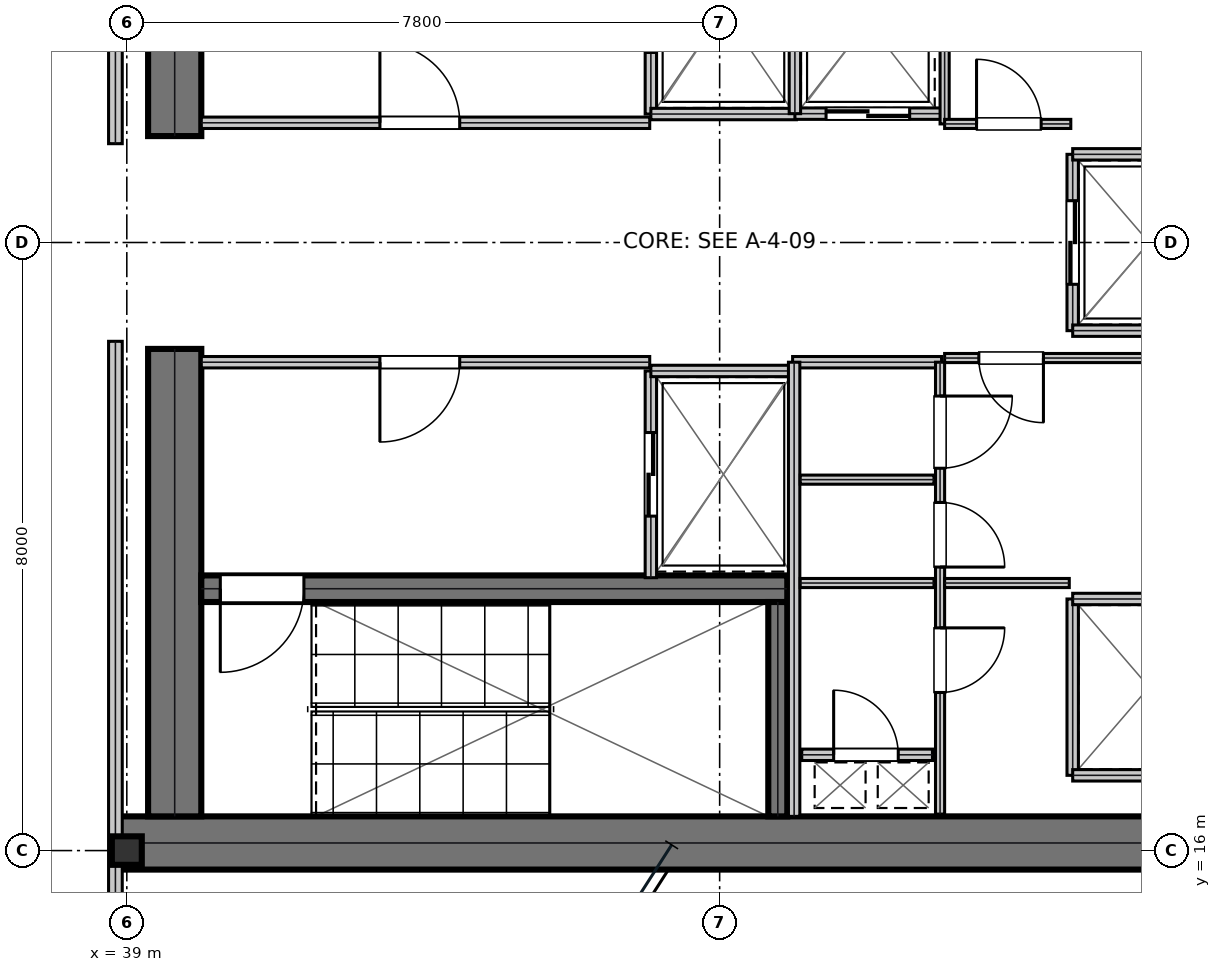
"""IFC4 building model, lengths in metres.
Left out: names, types, materials, properties, quantities, classifications, styles, units other than length and angle.
Written with IfcOpenShell. Run it as: python <this file> out.ifc"""

import sys

from ifc_helpers import new_model, si_unit, direction, frame, frame_2d, origin, origin_2d, place, context, subcontext, project, spatial, rectangle, i_section, extrude, element, fill, save


model = new_model("IFC4")
c1 = context("Model", 3, precision=1e-05, world=origin(), true_north=direction((0.0, 1.0)))
c2 = subcontext(c1, "Body", "Model", "MODEL_VIEW")
j1 = project(units=[si_unit("LENGTHUNIT", "METRE"), si_unit("PLANEANGLEUNIT", "RADIAN")], contexts=[c1])
p1 = place(None, origin())
s1 = spatial("IfcSite", under=j1, at=p1, CompositionType="ELEMENT")
p2 = place(p1, origin())
s2 = spatial("IfcBuilding", under=s1, at=p2, CompositionType="ELEMENT")
p3 = place(p2, frame((0.0, 0.0, 191.85)))
s3 = spatial("IfcBuildingStorey", under=s2, at=p3, CompositionType="ELEMENT", Elevation=191.85)
p4 = place(p3, frame((38.8, 16.1, 0.0), z_axis=(0.0, 0.0, 1.0), x_axis=(1.0, 0.0, 0.0)))
e1 = element("IfcWall", 1, at=p4, inside=s3, PredefinedType="SHEAR", context=c2, shape_type="SweptSolid", body=[
    extrude(rectangle(XDim=16.0, YDim=0.7, at=frame_2d((8.0, 0.0))), origin(), (0.0, 0.0, 1.0), 3.79),
])
for number, where, z_axis, x_axis in (
    (2, (39.63, 16.45, 0.0), (0.0, 0.0, 1.0), (0.0, 1.0, 0.0)),
    (3, (39.63, 25.4, 0.0), (0.0, 0.0, 1.0), (0.0, 1.0, 0.0)),
):
    element("IfcWall", number, at=place(p3, frame(where, z_axis=z_axis, x_axis=x_axis)), inside=s3, PredefinedType="SHEAR", context=c2, shape_type="SweptSolid", body=[
        extrude(rectangle(XDim=6.15, YDim=0.7, at=frame_2d((3.075, 0.0))), origin(), (0.0, 0.0, 1.0), 3.79),
    ])
p5 = place(p3, frame((39.98, 19.445, 0.0), z_axis=(0.0, 0.0, 1.0), x_axis=(1.0, 0.0, 0.0)))
e4 = element("IfcWall", 4, at=p5, inside=s3, PredefinedType="SHEAR", context=c2, shape_type="SweptSolid", body=[
    extrude(rectangle(XDim=7.71, YDim=0.35, at=frame_2d((3.855, 0.0))), origin(), (0.0, 0.0, 1.0), 3.79),
])
p6 = place(p5, frame((0.25, 0.0, 0.0)))
e5 = element("IfcOpeningElement", 5, at=p6, cuts=e4, PredefinedType="OPENING", context=c2, shape_type="SweptSolid", body=[
    extrude(rectangle(XDim=1.1, YDim=2.15, at=frame_2d((0.55, 1.075))), frame((0.0, 0.185, 0.0), z_axis=(0.0, -1.0, 0.0), x_axis=(1.0, 0.0, 0.0)), (0.0, 0.0, 1.0), 0.37),
])
p7 = place(p3, frame((47.565, 16.45, 0.0), z_axis=(0.0, 0.0, 1.0), x_axis=(0.0, 1.0, 0.0)))
e6 = element("IfcWall", 6, at=p7, inside=s3, PredefinedType="SHEAR", context=c2, shape_type="SweptSolid", body=[
    extrude(rectangle(XDim=2.82, YDim=0.25, at=frame_2d((1.41, 0.0))), origin(), (0.0, 0.0, 1.0), 3.79),
])
p8 = place(p3, frame((39.0, 16.0, 0.0), z_axis=(0.0, 0.0, 1.0), x_axis=(1.0, 0.0, 0.0)))
e7 = element("IfcColumn", 7, at=p8, inside=s3, PredefinedType="COLUMN", context=c2, shape_type="SweptSolid", body=[
    extrude(i_section(OverallWidth=0.394, OverallDepth=0.375, WebThickness=0.017, FlangeThickness=0.028, at=origin_2d()), origin(), (0.0, 0.0, 1.0), 4.044),
])
p9 = place(p3, frame((39.98, 25.575, 0.0), z_axis=(0.0, 0.0, 1.0), x_axis=(1.0, 0.0, 0.0)))
e8 = element("IfcWall", 8, at=p9, inside=s3, PredefinedType="PARTITIONING", context=c2, shape_type="SweptSolid", body=[
    extrude(rectangle(XDim=5.9, YDim=0.15, at=frame_2d((2.95, 0.0))), origin(), (0.0, 0.0, 1.0), 3.79),
])
p10 = place(p9, frame((2.35, 0.0, 0.0)))
e9 = element("IfcOpeningElement", 9, at=p10, cuts=e8, PredefinedType="OPENING", context=c2, shape_type="SweptSolid", body=[
    extrude(rectangle(XDim=1.05, YDim=2.15, at=frame_2d((0.525, 1.075))), frame((0.0, 0.085, 0.0), z_axis=(0.0, -1.0, 0.0), x_axis=(1.0, 0.0, 0.0)), (0.0, 0.0, 1.0), 0.17),
])
p11 = place(p3, frame((39.98, 22.425, 0.0), z_axis=(0.0, 0.0, 1.0), x_axis=(1.0, 0.0, 0.0)))
e10 = element("IfcWall", 10, at=p11, inside=s3, PredefinedType="PARTITIONING", context=c2, shape_type="SweptSolid", body=[
    extrude(rectangle(XDim=5.9, YDim=0.15, at=frame_2d((2.95, 0.0))), origin(), (0.0, 0.0, 1.0), 3.79),
])
p12 = place(p11, frame((2.35, 0.0, 0.0)))
e11 = element("IfcOpeningElement", 11, at=p12, cuts=e10, PredefinedType="OPENING", context=c2, shape_type="SweptSolid", body=[
    extrude(rectangle(XDim=1.05, YDim=2.15, at=frame_2d((0.525, 1.075))), frame((0.0, 0.085, 0.0), z_axis=(0.0, -1.0, 0.0), x_axis=(1.0, 0.0, 0.0)), (0.0, 0.0, 1.0), 0.17),
])
p13 = place(p3, frame((45.895, 25.69, 0.0), z_axis=(0.0, 0.0, 1.0), x_axis=(0.0, 1.0, 0.0)))
e12 = element("IfcWall", 12, at=p13, inside=s3, PredefinedType="PARTITIONING", context=c2, shape_type="SweptSolid", body=[
    extrude(rectangle(XDim=2.72, YDim=0.15, at=frame_2d((1.36, 0.0))), origin(), (0.0, 0.0, 1.0), 3.79),
])
p14 = place(p13, frame((0.81, 0.0, 0.0)))
e13 = element("IfcOpeningElement", 13, at=p14, cuts=e12, PredefinedType="OPENING", context=c2, shape_type="SweptSolid", body=[
    extrude(rectangle(XDim=1.1, YDim=2.15, at=frame_2d((0.55, 1.075))), frame((0.0, 0.085, 0.0), z_axis=(0.0, -1.0, 0.0), x_axis=(1.0, 0.0, 0.0)), (0.0, 0.0, 1.0), 0.17),
])
p15 = place(p3, frame((45.895, 25.69, 0.0), z_axis=(0.0, 0.0, 1.0), x_axis=(1.0, 0.0, 0.0)))
e14 = element("IfcWall", 14, at=p15, inside=s3, PredefinedType="PARTITIONING", context=c2, shape_type="SweptSolid", body=[
    extrude(rectangle(XDim=1.915, YDim=0.15, at=frame_2d((0.958, 0.0))), origin(), (0.0, 0.0, 1.0), 3.79),
])
p16 = place(p3, frame((45.895, 19.59, 0.0), z_axis=(0.0, 0.0, 1.0), x_axis=(0.0, 1.0, 0.0)))
e15 = element("IfcWall", 15, at=p16, inside=s3, PredefinedType="PARTITIONING", context=c2, shape_type="SweptSolid", body=[
    extrude(rectangle(XDim=2.72, YDim=0.15, at=frame_2d((1.36, 0.0))), origin(), (0.0, 0.0, 1.0), 3.79),
])
p17 = place(p16, frame((0.81, 0.0, 0.0)))
e16 = element("IfcOpeningElement", 16, at=p17, cuts=e15, PredefinedType="OPENING", context=c2, shape_type="SweptSolid", body=[
    extrude(rectangle(XDim=1.1, YDim=2.15, at=frame_2d((0.55, 1.075))), frame((0.0, 0.085, 0.0), z_axis=(0.0, -1.0, 0.0), x_axis=(1.0, 0.0, 0.0)), (0.0, 0.0, 1.0), 0.17),
])
p18 = place(p3, frame((45.895, 22.31, 0.0), z_axis=(0.0, 0.0, 1.0), x_axis=(1.0, 0.0, 0.0)))
e17 = element("IfcWall", 17, at=p18, inside=s3, PredefinedType="PARTITIONING", context=c2, shape_type="SweptSolid", body=[
    extrude(rectangle(XDim=1.915, YDim=0.15, at=frame_2d((0.958, 0.0))), origin(), (0.0, 0.0, 1.0), 3.79),
])
p19 = place(p3, frame((47.79, 25.695, 0.0), z_axis=(0.0, 0.0, 1.0), x_axis=(1.0, 0.0, 0.0)))
e18 = element("IfcWall", 18, at=p19, inside=s3, PredefinedType="PARTITIONING", context=c2, shape_type="SweptSolid", body=[
    extrude(rectangle(XDim=1.92, YDim=0.15, at=frame_2d((0.96, 0.0))), origin(), (0.0, 0.0, 1.0), 3.79),
])
p20 = place(p19, frame((0.41, 0.0, 0.0)))
e19 = element("IfcOpeningElement", 19, at=p20, cuts=e18, PredefinedType="OPENING", context=c2, shape_type="SweptSolid", body=[
    extrude(rectangle(XDim=1.1, YDim=2.15, at=frame_2d((0.55, 1.075))), frame((0.0, 0.085, 0.0), z_axis=(0.0, -1.0, 0.0), x_axis=(1.0, 0.0, 0.0)), (0.0, 0.0, 1.0), 0.17),
])
p21 = place(p3, frame((47.79, 25.695, 0.0), z_axis=(0.0, 0.0, 1.0), x_axis=(0.0, 1.0, 0.0)))
e20 = element("IfcWall", 20, at=p21, inside=s3, PredefinedType="PARTITIONING", context=c2, shape_type="SweptSolid", body=[
    extrude(rectangle(XDim=2.415, YDim=0.15, at=frame_2d((1.208, 0.0))), origin(), (0.0, 0.0, 1.0), 3.79),
])
p22 = place(p3, frame((51.445, 22.84, 0.0), z_axis=(0.0, 0.0, 1.0), x_axis=(0.0, 1.0, 0.0)))
e21 = element("IfcWall", 21, at=p22, inside=s3, PredefinedType="PARTITIONING", context=c2, shape_type="SweptSolid", body=[
    extrude(rectangle(XDim=2.32, YDim=0.15, at=frame_2d((1.16, 0.0))), origin(), (0.0, 0.0, 1.0), 3.79),
])
p23 = place(p22, frame((0.61, 0.0, 0.0)))
e22 = element("IfcOpeningElement", 22, at=p23, cuts=e21, PredefinedType="OPENING", context=c2, shape_type="SweptSolid", body=[
    extrude(rectangle(XDim=1.1, YDim=2.15, at=frame_2d((0.55, 1.075))), frame((0.0, 0.085, 0.0), z_axis=(0.0, -1.0, 0.0), x_axis=(1.0, 0.0, 0.0)), (0.0, 0.0, 1.0), 0.17),
])
for number, where, z_axis, x_axis in (
    (23, (51.445, 22.84, 0.0), (0.0, 0.0, 1.0), (1.0, 0.0, 0.0)),
    (24, (51.445, 25.16, 0.0), (0.0, 0.0, 1.0), (1.0, 0.0, 0.0)),
):
    element("IfcWall", number, at=place(p3, frame(where, z_axis=z_axis, x_axis=x_axis)), inside=s3, PredefinedType="PARTITIONING", context=c2, shape_type="SweptSolid", body=[
        extrude(rectangle(XDim=2.015, YDim=0.15, at=frame_2d((1.007, 0.0))), origin(), (0.0, 0.0, 1.0), 3.79),
    ])
p24 = place(p3, frame((51.445, 16.99, 0.0), z_axis=(0.0, 0.0, 1.0), x_axis=(0.0, 1.0, 0.0)))
e25 = element("IfcWall", 25, at=p24, inside=s3, PredefinedType="PARTITIONING", context=c2, shape_type="SweptSolid", body=[
    extrude(rectangle(XDim=2.32, YDim=0.15, at=frame_2d((1.16, 0.0))), origin(), (0.0, 0.0, 1.0), 3.79),
])
for number, where, z_axis, x_axis in (
    (26, (51.445, 16.99, 0.0), (0.0, 0.0, 1.0), (1.0, 0.0, 0.0)),
    (27, (51.445, 19.31, 0.0), (0.0, 0.0, 1.0), (1.0, 0.0, 0.0)),
):
    element("IfcWall", number, at=place(p3, frame(where, z_axis=z_axis, x_axis=x_axis)), inside=s3, PredefinedType="PARTITIONING", context=c2, shape_type="SweptSolid", body=[
        extrude(rectangle(XDim=2.015, YDim=0.15, at=frame_2d((1.007, 0.0))), origin(), (0.0, 0.0, 1.0), 3.79),
    ])
p25 = place(p3, frame((47.88, 17.26, 0.0), z_axis=(0.0, 0.0, 1.0), x_axis=(1.0, 0.0, 0.0)))
e28 = element("IfcWall", 28, at=p25, inside=s3, PredefinedType="PARTITIONING", context=c2, shape_type="SweptSolid", body=[
    extrude(rectangle(XDim=1.72, YDim=0.15, at=frame_2d((0.86, 0.0))), origin(), (0.0, 0.0, 1.0), 3.79),
])
p26 = place(p25, frame((0.42, 0.0, 0.0)))
e29 = element("IfcOpeningElement", 29, at=p26, cuts=e28, PredefinedType="OPENING", context=c2, shape_type="SweptSolid", body=[
    extrude(rectangle(XDim=0.85, YDim=2.15, at=frame_2d((0.425, 1.075))), frame((0.0, 0.085, 0.0), z_axis=(0.0, -1.0, 0.0), x_axis=(1.0, 0.0, 0.0)), (0.0, 0.0, 1.0), 0.17),
])
p27 = place(p3, frame((47.76, 22.425, 0.0), z_axis=(0.0, 0.0, 1.0), x_axis=(1.0, 0.0, 0.0)))
e30 = element("IfcWall", 30, at=p27, inside=s3, PredefinedType="PARTITIONING", context=c2, shape_type="SweptSolid", body=[
    extrude(rectangle(XDim=1.96, YDim=0.15, at=frame_2d((0.98, 0.0))), origin(), (0.0, 0.0, 1.0), 3.79),
])
p28 = place(p3, frame((47.78, 16.45, 0.0), z_axis=(0.0, 0.0, 1.0), x_axis=(0.0, 1.0, 0.0)))
e31 = element("IfcWall", 31, at=p28, inside=s3, PredefinedType="PARTITIONING", context=c2, shape_type="SweptSolid", body=[
    extrude(rectangle(XDim=5.975, YDim=0.15, at=frame_2d((2.988, 0.0))), origin(), (0.0, 0.0, 1.0), 3.79),
])
for number, where, z_axis, x_axis in (
    (32, (47.86, 19.52, 0.0), (0.0, 0.0, 1.0), (1.0, 0.0, 0.0)),
    (33, (47.86, 20.88, 0.0), (0.0, 0.0, 1.0), (1.0, 0.0, 0.0)),
):
    element("IfcWall", number, at=place(p3, frame(where, z_axis=z_axis, x_axis=x_axis)), inside=s3, PredefinedType="PARTITIONING", context=c2, shape_type="SweptSolid", body=[
        extrude(rectangle(XDim=1.76, YDim=0.12, at=frame_2d((0.88, 0.0))), origin(), (0.0, 0.0, 1.0), 3.79),
    ])
p29 = place(p3, frame((49.7, 16.48, 0.0), z_axis=(0.0, 0.0, 1.0), x_axis=(0.0, 1.0, 0.0)))
e34 = element("IfcWall", 34, at=p29, inside=s3, PredefinedType="PARTITIONING", context=c2, shape_type="SweptSolid", body=[
    extrude(rectangle(XDim=5.945, YDim=0.12, at=frame_2d((2.973, 0.0))), origin(), (0.0, 0.0, 1.0), 3.79),
])
p30 = place(p29, frame((1.6, 0.0, 0.0)))
e35 = element("IfcOpeningElement", 35, at=p30, cuts=e34, PredefinedType="OPENING", context=c2, shape_type="SweptSolid", body=[
    extrude(rectangle(XDim=0.85, YDim=2.15, at=frame_2d((0.425, 1.075))), frame((0.0, 0.07, 0.0), z_axis=(0.0, -1.0, 0.0), x_axis=(1.0, 0.0, 0.0)), (0.0, 0.0, 1.0), 0.14),
])
p31 = place(p29, frame((3.25, 0.0, 0.0)))
e36 = element("IfcOpeningElement", 36, at=p31, cuts=e34, PredefinedType="OPENING", context=c2, shape_type="SweptSolid", body=[
    extrude(rectangle(XDim=0.85, YDim=2.15, at=frame_2d((0.425, 1.075))), frame((0.0, 0.07, 0.0), z_axis=(0.0, -1.0, 0.0), x_axis=(1.0, 0.0, 0.0)), (0.0, 0.0, 1.0), 0.14),
])
p32 = place(p29, frame((4.55, 0.0, 0.0)))
e37 = element("IfcOpeningElement", 37, at=p32, cuts=e34, PredefinedType="OPENING", context=c2, shape_type="SweptSolid", body=[
    extrude(rectangle(XDim=0.95, YDim=2.15, at=frame_2d((0.475, 1.075))), frame((0.0, 0.07, 0.0), z_axis=(0.0, -1.0, 0.0), x_axis=(1.0, 0.0, 0.0)), (0.0, 0.0, 1.0), 0.14),
])
p33 = place(p3, frame((49.76, 22.48, 0.0), z_axis=(0.0, 0.0, 1.0), x_axis=(1.0, 0.0, 0.0)))
e38 = element("IfcWall", 38, at=p33, inside=s3, PredefinedType="PARTITIONING", context=c2, shape_type="SweptSolid", body=[
    extrude(rectangle(XDim=3.9, YDim=0.12, at=frame_2d((1.95, 0.0))), origin(), (0.0, 0.0, 1.0), 3.79),
])
p34 = place(p33, frame((0.45, 0.0, 0.0)))
e39 = element("IfcOpeningElement", 39, at=p34, cuts=e38, PredefinedType="OPENING", context=c2, shape_type="SweptSolid", body=[
    extrude(rectangle(XDim=0.85, YDim=2.15, at=frame_2d((0.425, 1.075))), frame((0.0, 0.07, 0.0), z_axis=(0.0, -1.0, 0.0), x_axis=(1.0, 0.0, 0.0)), (0.0, 0.0, 1.0), 0.14),
])
p35 = place(p3, frame((49.76, 19.52, 0.0), z_axis=(0.0, 0.0, 1.0), x_axis=(1.0, 0.0, 0.0)))
e40 = element("IfcWall", 40, at=p35, inside=s3, PredefinedType="PARTITIONING", context=c2, shape_type="SweptSolid", body=[
    extrude(rectangle(XDim=1.64, YDim=0.12, at=frame_2d((0.82, 0.0))), origin(), (0.0, 0.0, 1.0), 3.79),
])
p36 = place(p3, frame((49.76, 25.56, 0.0), z_axis=(0.0, 0.0, 1.0), x_axis=(0.0, 1.0, 0.0)))
e41 = element("IfcWall", 41, at=p36, inside=s3, PredefinedType="PARTITIONING", context=c2, shape_type="SweptSolid", body=[
    extrude(rectangle(XDim=2.66, YDim=0.12, at=frame_2d((1.33, 0.0))), origin(), (0.0, 0.0, 1.0), 3.79),
])
p37 = place(p3, frame((49.76, 25.56, 0.0), z_axis=(0.0, 0.0, 1.0), x_axis=(1.0, 0.0, 0.0)))
e42 = element("IfcWall", 42, at=p37, inside=s3, PredefinedType="PARTITIONING", context=c2, shape_type="SweptSolid", body=[
    extrude(rectangle(XDim=1.66, YDim=0.12, at=frame_2d((0.83, 0.0))), origin(), (0.0, 0.0, 1.0), 3.79),
])
p38 = place(p37, frame((0.42, 0.0, 0.0)))
e43 = element("IfcOpeningElement", 43, at=p38, cuts=e42, PredefinedType="OPENING", context=c2, shape_type="SweptSolid", body=[
    extrude(rectangle(XDim=0.85, YDim=2.15, at=frame_2d((0.425, 1.075))), frame((0.0, 0.07, 0.0), z_axis=(0.0, -1.0, 0.0), x_axis=(1.0, 0.0, 0.0)), (0.0, 0.0, 1.0), 0.14),
])
for number, where, z_axis, x_axis in (
    (44, (38.85, 14.5, 0.0), (0.0, 0.0, 1.0), (0.0, 1.0, 0.0)),
    (45, (38.85, 25.3, 0.0), (0.0, 0.0, 1.0), (0.0, 1.0, 0.0)),
):
    element("IfcWall", number, at=place(p3, frame(where, z_axis=z_axis, x_axis=x_axis)), inside=s3, PredefinedType="SOLIDWALL", context=c2, shape_type="SweptSolid", body=[
        extrude(rectangle(XDim=8.2, YDim=0.18, at=frame_2d((4.1, 0.0))), origin(), (0.0, 0.0, 1.0), 3.241),
    ])
p39 = place(p10, origin())
e46 = element("IfcDoor", 46, at=p39, inside=s3, OperationType="SINGLE_SWING_LEFT", PredefinedType="DOOR", context=c2, shape_type="SweptSolid", body=[
    extrude(rectangle(XDim=1.05, YDim=2.15, at=frame_2d((0.525, 1.075))), frame((0.0, 0.025, 0.0), z_axis=(0.0, -1.0, 0.0), x_axis=(1.0, 0.0, 0.0)), (0.0, 0.0, 1.0), 0.05),
])
fill(e9, e46)
p40 = place(p12, frame((1.05, 0.0, 0.0), z_axis=(0.0, 0.0, 1.0), x_axis=(-1.0, 0.0, 0.0)))
e47 = element("IfcDoor", 47, at=p40, inside=s3, OperationType="SINGLE_SWING_RIGHT", PredefinedType="DOOR", context=c2, shape_type="SweptSolid", body=[
    extrude(rectangle(XDim=1.05, YDim=2.15, at=frame_2d((0.525, 1.075))), frame((0.0, 0.025, 0.0), z_axis=(0.0, -1.0, 0.0), x_axis=(1.0, 0.0, 0.0)), (0.0, 0.0, 1.0), 0.05),
])
fill(e11, e47)
p41 = place(p17, frame((1.1, 0.0, 0.0), z_axis=(0.0, 0.0, 1.0), x_axis=(-1.0, 0.0, 0.0)))
e48 = element("IfcDoor", 48, at=p41, inside=s3, OperationType="DOUBLE_DOOR_SLIDING", PredefinedType="DOOR", context=c2, shape_type="SweptSolid", body=[
    extrude(rectangle(XDim=1.1, YDim=2.15, at=frame_2d((0.55, 1.075))), frame((0.0, 0.025, 0.0), z_axis=(0.0, -1.0, 0.0), x_axis=(1.0, 0.0, 0.0)), (0.0, 0.0, 1.0), 0.05),
])
fill(e16, e48)
p42 = place(p20, frame((1.1, 0.0, 0.0), z_axis=(0.0, 0.0, 1.0), x_axis=(-1.0, 0.0, 0.0)))
e49 = element("IfcDoor", 49, at=p42, inside=s3, OperationType="DOUBLE_DOOR_SLIDING", PredefinedType="DOOR", context=c2, shape_type="SweptSolid", body=[
    extrude(rectangle(XDim=1.1, YDim=2.15, at=frame_2d((0.55, 1.075))), frame((0.0, 0.025, 0.0), z_axis=(0.0, -1.0, 0.0), x_axis=(1.0, 0.0, 0.0)), (0.0, 0.0, 1.0), 0.05),
])
fill(e19, e49)
p43 = place(p23, frame((1.1, 0.0, 0.0), z_axis=(0.0, 0.0, 1.0), x_axis=(-1.0, 0.0, 0.0)))
e50 = element("IfcDoor", 50, at=p43, inside=s3, OperationType="DOUBLE_DOOR_SLIDING", PredefinedType="DOOR", context=c2, shape_type="SweptSolid", body=[
    extrude(rectangle(XDim=1.1, YDim=2.15, at=frame_2d((0.55, 1.075))), frame((0.0, 0.025, 0.0), z_axis=(0.0, -1.0, 0.0), x_axis=(1.0, 0.0, 0.0)), (0.0, 0.0, 1.0), 0.05),
])
fill(e22, e50)
p44 = place(p26, origin())
e51 = element("IfcDoor", 51, at=p44, inside=s3, OperationType="SINGLE_SWING_LEFT", PredefinedType="TRAPDOOR", context=c2, shape_type="SweptSolid", body=[
    extrude(rectangle(XDim=0.85, YDim=2.15, at=frame_2d((0.425, 1.075))), frame((0.0, 0.025, 0.0), z_axis=(0.0, -1.0, 0.0), x_axis=(1.0, 0.0, 0.0)), (0.0, 0.0, 1.0), 0.05),
])
fill(e29, e51)
p45 = place(p30, frame((0.85, 0.0, 0.0), z_axis=(0.0, 0.0, 1.0), x_axis=(-1.0, 0.0, 0.0)))
e52 = element("IfcDoor", 52, at=p45, inside=s3, OperationType="SINGLE_SWING_LEFT", PredefinedType="DOOR", context=c2, shape_type="SweptSolid", body=[
    extrude(rectangle(XDim=0.85, YDim=2.15, at=frame_2d((0.425, 1.075))), frame((0.0, 0.025, 0.0), z_axis=(0.0, -1.0, 0.0), x_axis=(1.0, 0.0, 0.0)), (0.0, 0.0, 1.0), 0.05),
])
fill(e35, e52)
p46 = place(p31, frame((0.85, 0.0, 0.0), z_axis=(0.0, 0.0, 1.0), x_axis=(-1.0, 0.0, 0.0)))
e53 = element("IfcDoor", 53, at=p46, inside=s3, OperationType="SINGLE_SWING_RIGHT", PredefinedType="DOOR", context=c2, shape_type="SweptSolid", body=[
    extrude(rectangle(XDim=0.85, YDim=2.15, at=frame_2d((0.425, 1.075))), frame((0.0, 0.025, 0.0), z_axis=(0.0, -1.0, 0.0), x_axis=(1.0, 0.0, 0.0)), (0.0, 0.0, 1.0), 0.05),
])
fill(e36, e53)
p47 = place(p32, frame((0.95, 0.0, 0.0), z_axis=(0.0, 0.0, 1.0), x_axis=(-1.0, 0.0, 0.0)))
e54 = element("IfcDoor", 54, at=p47, inside=s3, OperationType="SINGLE_SWING_LEFT", PredefinedType="DOOR", context=c2, shape_type="SweptSolid", body=[
    extrude(rectangle(XDim=0.95, YDim=2.15, at=frame_2d((0.475, 1.075))), frame((0.0, 0.025, 0.0), z_axis=(0.0, -1.0, 0.0), x_axis=(1.0, 0.0, 0.0)), (0.0, 0.0, 1.0), 0.05),
])
fill(e37, e54)
p48 = place(p34, frame((0.85, 0.0, 0.0), z_axis=(0.0, 0.0, 1.0), x_axis=(-1.0, 0.0, 0.0)))
e55 = element("IfcDoor", 55, at=p48, inside=s3, OperationType="SINGLE_SWING_LEFT", PredefinedType="DOOR", context=c2, shape_type="SweptSolid", body=[
    extrude(rectangle(XDim=0.85, YDim=2.15, at=frame_2d((0.425, 1.075))), frame((0.0, 0.025, 0.0), z_axis=(0.0, -1.0, 0.0), x_axis=(1.0, 0.0, 0.0)), (0.0, 0.0, 1.0), 0.05),
])
fill(e39, e55)
p49 = place(p38, origin())
e56 = element("IfcDoor", 56, at=p49, inside=s3, OperationType="SINGLE_SWING_LEFT", PredefinedType="DOOR", context=c2, shape_type="SweptSolid", body=[
    extrude(rectangle(XDim=0.85, YDim=2.15, at=frame_2d((0.425, 1.075))), frame((0.0, 0.025, 0.0), z_axis=(0.0, -1.0, 0.0), x_axis=(1.0, 0.0, 0.0)), (0.0, 0.0, 1.0), 0.05),
])
fill(e43, e56)
p50 = place(p6, frame((1.1, 0.0, 0.0), z_axis=(0.0, 0.0, 1.0), x_axis=(-1.0, 0.0, 0.0)))
e57 = element("IfcDoor", 57, at=p50, inside=s3, OperationType="SINGLE_SWING_RIGHT", PredefinedType="DOOR", context=c2, shape_type="SweptSolid", body=[
    extrude(rectangle(XDim=1.1, YDim=2.15, at=frame_2d((0.55, 1.075))), frame((0.0, 0.025, 0.0), z_axis=(0.0, -1.0, 0.0), x_axis=(1.0, 0.0, 0.0)), (0.0, 0.0, 1.0), 0.05),
])
fill(e5, e57)
save(model, sys.argv[1])
